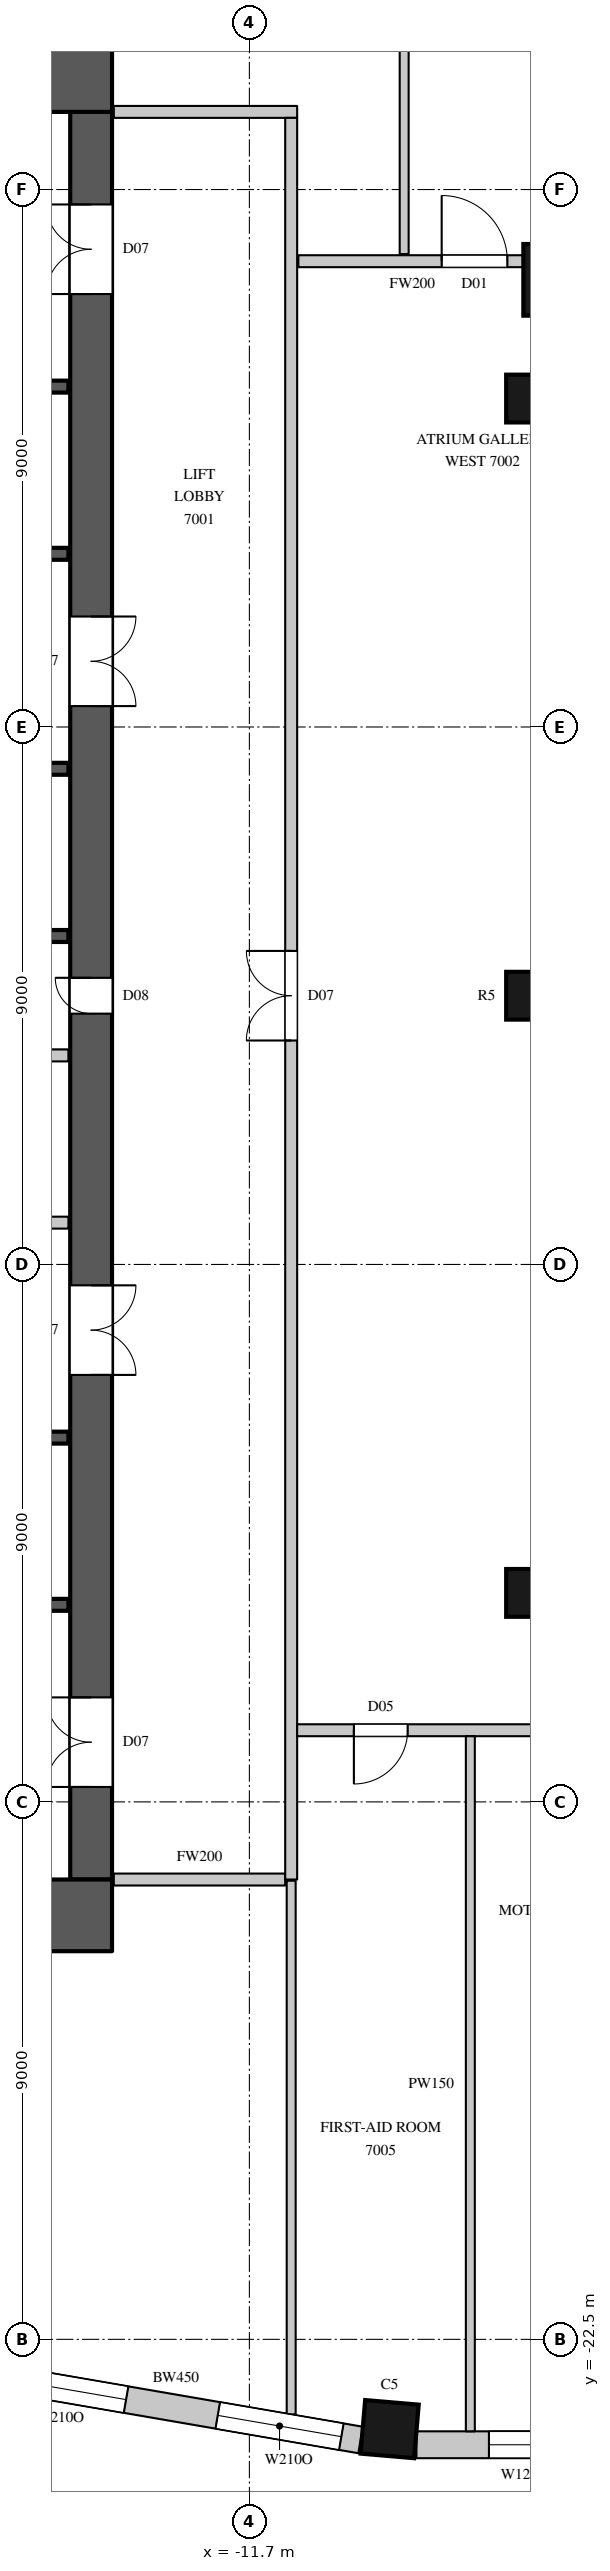
"""IFC4 building model, lengths in metres.
Left out: names, types, materials, properties, quantities, classifications, styles, units other than length and angle.
Written with IfcOpenShell. Run it as: python <this file> out.ifc"""

import sys

from ifc_helpers import new_model, si_unit, direction, frame, frame_2d, origin, origin_2d, place, context, subcontext, project, spatial, rectangle, circle, extrude, element, fill, save


model = new_model("IFC4")
c1 = context("Model", 3, precision=1e-05, world=origin(), true_north=direction((0.0, 1.0)))
c2 = subcontext(c1, "Body", "Model", "MODEL_VIEW")
j1 = project(units=[si_unit("LENGTHUNIT", "METRE"), si_unit("PLANEANGLEUNIT", "RADIAN")], contexts=[c1])
p1 = place(None, origin())
s1 = spatial("IfcSite", under=j1, at=p1, CompositionType="ELEMENT")
p2 = place(p1, origin())
s2 = spatial("IfcBuilding", under=s1, at=p2, CompositionType="ELEMENT")
p3 = place(p2, frame((0.0, 0.0, 309.0)))
s3 = spatial("IfcBuildingStorey", under=s2, at=p3, CompositionType="ELEMENT", Elevation=309.0)
p4 = place(p3, frame((-6.512, 11.988, 0.0), z_axis=(0.0, 0.0, 1.0), x_axis=(1.0, 0.0, 0.0)))
e1 = element("IfcColumn", 1, at=p4, inside=s3, PredefinedType="COLUMN", context=c2, shape_type="SweptSolid", body=[
    extrude(circle(Radius=0.6, at=origin_2d()), origin(), (0.0, 0.0, 1.0), 4.1),
])
p5 = place(p3, frame((-9.351, -24.003, 0.0), z_axis=(0.0, 0.0, 1.0), x_axis=(0.996368206733, -0.085149260784, 0.0)))
e2 = element("IfcColumn", 2, at=p5, inside=s3, PredefinedType="COLUMN", context=c2, shape_type="SweptSolid", body=[
    extrude(rectangle(XDim=0.9, YDim=0.9, at=origin_2d()), origin(), (0.0, 0.0, 1.0), 4.1),
])
for number, where, z_axis, x_axis in (
    (3, (-7.0, -10.0, 0.0), (0.0, 0.0, 1.0), (1.0, 0.0, 0.0)),
    (4, (-7.0, 0.0, 0.0), (0.0, 0.0, 1.0), (1.0, 0.0, 0.0)),
    (5, (-7.0, 10.0, 0.0), (0.0, 0.0, 1.0), (1.0, 0.0, 0.0)),
):
    element("IfcColumn", number, at=place(p3, frame(where, z_axis=z_axis, x_axis=x_axis)), inside=s3, PredefinedType="COLUMN", context=c2, shape_type="SweptSolid", body=[
        extrude(circle(Radius=0.4, at=origin_2d()), origin(), (0.0, 0.0, 1.0), 4.1),
    ])
p6 = place(p3, frame((-16.157, -23.097, 0.0), z_axis=(0.0, 0.0, 1.0), x_axis=(0.985502073964, -0.169663379113, 0.0)))
e6 = element("IfcWall", 6, at=p6, inside=s3, PredefinedType="SOLIDWALL", context=c2, shape_type="SweptSolid", body=[
    extrude(rectangle(XDim=6.412, YDim=0.45, at=frame_2d((3.206, 0.0))), origin(), (0.0, 0.0, 1.0), 3.8),
])
p7 = place(p6, frame((0.327, 0.0, 1.05)))
e7 = element("IfcOpeningElement", 7, at=p7, cuts=e6, PredefinedType="OPENING", context=c2, shape_type="SweptSolid", body=[
    extrude(rectangle(XDim=2.1, YDim=2.4, at=frame_2d((1.05, 1.2))), frame((0.0, 0.235, 0.0), z_axis=(0.0, -1.0, 0.0), x_axis=(1.0, 0.0, 0.0)), (0.0, 0.0, 1.0), 0.47),
])
p8 = place(p6, frame((3.985, 0.0, 1.05)))
e8 = element("IfcOpeningElement", 8, at=p8, cuts=e6, PredefinedType="OPENING", context=c2, shape_type="SweptSolid", body=[
    extrude(rectangle(XDim=2.1, YDim=2.4, at=frame_2d((1.05, 1.2))), frame((0.0, 0.235, 0.0), z_axis=(0.0, -1.0, 0.0), x_axis=(1.0, 0.0, 0.0)), (0.0, 0.0, 1.0), 0.47),
])
p9 = place(p3, frame((-8.903, -24.265, 0.0), z_axis=(0.0, 0.0, 1.0), x_axis=(1.0, 0.0, 0.0)))
e9 = element("IfcWall", 9, at=p9, inside=s3, PredefinedType="SOLIDWALL", context=c2, shape_type="SweptSolid", body=[
    extrude(rectangle(XDim=6.406, YDim=0.45, at=frame_2d((3.203, 0.0))), origin(), (0.0, 0.0, 1.0), 3.8),
])
p10 = place(p9, frame((3.98, 0.0, 1.05)))
e10 = element("IfcOpeningElement", 10, at=p10, cuts=e9, PredefinedType="OPENING", context=c2, shape_type="SweptSolid", body=[
    extrude(rectangle(XDim=2.1, YDim=2.4, at=frame_2d((1.05, 1.2))), frame((0.0, 0.235, 0.0), z_axis=(0.0, -1.0, 0.0), x_axis=(1.0, 0.0, 0.0)), (0.0, 0.0, 1.0), 0.47),
])
p11 = place(p9, frame((1.214, 0.0, 1.05)))
e11 = element("IfcOpeningElement", 11, at=p11, cuts=e9, PredefinedType="OPENING", context=c2, shape_type="SweptSolid", body=[
    extrude(rectangle(XDim=1.2, YDim=2.4, at=frame_2d((0.6, 1.2))), frame((0.0, 0.235, 0.0), z_axis=(0.0, -1.0, 0.0), x_axis=(1.0, 0.0, 0.0)), (0.0, 0.0, 1.0), 0.47),
])
for number, where, z_axis, x_axis in (
    (12, (-30.0, 15.4, 0.0), (0.0, 0.0, 1.0), (1.0, 0.0, 0.0)),
    (13, (-30.0, -15.4, 0.0), (0.0, 0.0, 1.0), (1.0, 0.0, 0.0)),
):
    element("IfcWall", number, at=place(p3, frame(where, z_axis=z_axis, x_axis=x_axis)), inside=s3, PredefinedType="SHEAR", context=c2, shape_type="SweptSolid", body=[
        extrude(rectangle(XDim=16.0, YDim=1.2, at=frame_2d((8.0, 0.0))), origin(), (0.0, 0.0, 1.0), 4.1),
    ])
p12 = place(p3, frame((-14.35, -14.8, 0.0), z_axis=(0.0, 0.0, 1.0), x_axis=(0.0, 1.0, 0.0)))
e14 = element("IfcWall", 14, at=p12, inside=s3, PredefinedType="SHEAR", context=c2, shape_type="SweptSolid", body=[
    extrude(rectangle(XDim=29.6, YDim=0.7, at=frame_2d((14.8, 0.0))), origin(), (0.0, 0.0, 1.0), 4.1),
])
p13 = place(p12, frame((1.55, 0.0, 0.0)))
e15 = element("IfcOpeningElement", 15, at=p13, cuts=e14, PredefinedType="OPENING", context=c2, shape_type="SweptSolid", body=[
    extrude(rectangle(XDim=1.5, YDim=2.4, at=frame_2d((0.75, 1.2))), frame((0.0, 0.36, 0.0), z_axis=(0.0, -1.0, 0.0), x_axis=(1.0, 0.0, 0.0)), (0.0, 0.0, 1.0), 0.72),
])
p14 = place(p12, frame((26.55, 0.0, 0.0)))
e16 = element("IfcOpeningElement", 16, at=p14, cuts=e14, PredefinedType="OPENING", context=c2, shape_type="SweptSolid", body=[
    extrude(rectangle(XDim=1.5, YDim=2.4, at=frame_2d((0.75, 1.2))), frame((0.0, 0.36, 0.0), z_axis=(0.0, -1.0, 0.0), x_axis=(1.0, 0.0, 0.0)), (0.0, 0.0, 1.0), 0.72),
])
p15 = place(p12, frame((8.45, 0.0, 0.0)))
e17 = element("IfcOpeningElement", 17, at=p15, cuts=e14, PredefinedType="OPENING", context=c2, shape_type="SweptSolid", body=[
    extrude(rectangle(XDim=1.5, YDim=2.4, at=frame_2d((0.75, 1.2))), frame((0.0, 0.36, 0.0), z_axis=(0.0, -1.0, 0.0), x_axis=(1.0, 0.0, 0.0)), (0.0, 0.0, 1.0), 0.72),
])
p16 = place(p12, frame((19.65, 0.0, 0.0)))
e18 = element("IfcOpeningElement", 18, at=p16, cuts=e14, PredefinedType="OPENING", context=c2, shape_type="SweptSolid", body=[
    extrude(rectangle(XDim=1.5, YDim=2.4, at=frame_2d((0.75, 1.2))), frame((0.0, 0.36, 0.0), z_axis=(0.0, -1.0, 0.0), x_axis=(1.0, 0.0, 0.0)), (0.0, 0.0, 1.0), 0.72),
])
p17 = place(p12, frame((14.5, 0.0, 0.0)))
e19 = element("IfcOpeningElement", 19, at=p17, cuts=e14, PredefinedType="OPENING", context=c2, shape_type="SweptSolid", body=[
    extrude(rectangle(XDim=0.6, YDim=2.0, at=frame_2d((0.3, 1.0))), frame((0.0, 0.36, 0.0), z_axis=(0.0, -1.0, 0.0), x_axis=(1.0, 0.0, 0.0)), (0.0, 0.0, 1.0), 0.72),
])
p18 = place(p3, frame((-29.27, -3.8, 0.0), z_axis=(0.0, 0.0, 1.0), x_axis=(1.0, 0.0, 0.0)))
e20 = element("IfcWall", 20, at=p18, inside=s3, PredefinedType="PARTITIONING", context=c2, shape_type="SweptSolid", body=[
    extrude(rectangle(XDim=14.54, YDim=0.2, at=frame_2d((7.27, 0.0))), origin(), (0.0, 0.0, 1.0), 3.8),
])
p19 = place(p18, frame((6.8, 0.0, 0.0)))
e21 = element("IfcOpeningElement", 21, at=p19, cuts=e20, PredefinedType="OPENING", context=c2, shape_type="SweptSolid", body=[
    extrude(rectangle(XDim=0.9, YDim=2.2, at=frame_2d((0.45, 1.1))), frame((0.0, 0.11, 0.0), z_axis=(0.0, -1.0, 0.0), x_axis=(1.0, 0.0, 0.0)), (0.0, 0.0, 1.0), 0.22),
])
p20 = place(p3, frame((-13.97, -14.8, 0.0), z_axis=(0.0, 0.0, 1.0), x_axis=(1.0, 0.0, 0.0)))
e22 = element("IfcWall", 22, at=p20, inside=s3, PredefinedType="PARTITIONING", context=c2, shape_type="SweptSolid", body=[
    extrude(rectangle(XDim=2.87, YDim=0.2, at=frame_2d((1.435, 0.0))), origin(), (0.0, 0.0, 1.0), 3.8),
])
p21 = place(p3, frame((-13.97, 14.8, 0.0), z_axis=(0.0, 0.0, 1.0), x_axis=(1.0, 0.0, 0.0)))
e23 = element("IfcWall", 23, at=p21, inside=s3, PredefinedType="PARTITIONING", context=c2, shape_type="SweptSolid", body=[
    extrude(rectangle(XDim=3.07, YDim=0.2, at=frame_2d((1.535, 0.0))), origin(), (0.0, 0.0, 1.0), 3.8),
])
p22 = place(p3, frame((-11.0, -14.8, 0.0), z_axis=(0.0, 0.0, 1.0), x_axis=(0.0, 1.0, 0.0)))
e24 = element("IfcWall", 24, at=p22, inside=s3, PredefinedType="PARTITIONING", context=c2, shape_type="SweptSolid", body=[
    extrude(rectangle(XDim=29.5, YDim=0.2, at=frame_2d((14.75, 0.0))), origin(), (0.0, 0.0, 1.0), 3.8),
])
p23 = place(p22, frame((14.05, 0.0, 0.0)))
e25 = element("IfcOpeningElement", 25, at=p23, cuts=e24, PredefinedType="OPENING", context=c2, shape_type="SweptSolid", body=[
    extrude(rectangle(XDim=1.5, YDim=2.4, at=frame_2d((0.75, 1.2))), frame((0.0, 0.11, 0.0), z_axis=(0.0, -1.0, 0.0), x_axis=(1.0, 0.0, 0.0)), (0.0, 0.0, 1.0), 0.22),
])
p24 = place(p3, frame((-10.9, -12.3, 0.0), z_axis=(0.0, 0.0, 1.0), x_axis=(1.0, 0.0, 0.0)))
e26 = element("IfcWall", 26, at=p24, inside=s3, PredefinedType="PARTITIONING", context=c2, shape_type="SweptSolid", body=[
    extrude(rectangle(XDim=22.1, YDim=0.2, at=frame_2d((11.05, 0.0))), origin(), (0.0, 0.0, 1.0), 3.8),
])
p25 = place(p24, frame((0.95, 0.0, 0.0)))
e27 = element("IfcOpeningElement", 27, at=p25, cuts=e26, PredefinedType="OPENING", context=c2, shape_type="SweptSolid", body=[
    extrude(rectangle(XDim=0.9, YDim=2.2, at=frame_2d((0.45, 1.1))), frame((0.0, 0.11, 0.0), z_axis=(0.0, -1.0, 0.0), x_axis=(1.0, 0.0, 0.0)), (0.0, 0.0, 1.0), 0.22),
])
p26 = place(p24, frame((3.95, 0.0, 0.0)))
e28 = element("IfcOpeningElement", 28, at=p26, cuts=e26, PredefinedType="OPENING", context=c2, shape_type="SweptSolid", body=[
    extrude(rectangle(XDim=0.9, YDim=2.2, at=frame_2d((0.45, 1.1))), frame((0.0, 0.11, 0.0), z_axis=(0.0, -1.0, 0.0), x_axis=(1.0, 0.0, 0.0)), (0.0, 0.0, 1.0), 0.22),
])
p27 = place(p24, frame((7.1, 0.0, 0.0)))
e29 = element("IfcOpeningElement", 29, at=p27, cuts=e26, PredefinedType="OPENING", context=c2, shape_type="SweptSolid", body=[
    extrude(rectangle(XDim=0.9, YDim=2.2, at=frame_2d((0.45, 1.1))), frame((0.0, 0.11, 0.0), z_axis=(0.0, -1.0, 0.0), x_axis=(1.0, 0.0, 0.0)), (0.0, 0.0, 1.0), 0.22),
])
p28 = place(p24, frame((10.0, 0.0, 0.0)))
e30 = element("IfcOpeningElement", 30, at=p28, cuts=e26, PredefinedType="OPENING", context=c2, shape_type="SweptSolid", body=[
    extrude(rectangle(XDim=0.9, YDim=2.2, at=frame_2d((0.45, 1.1))), frame((0.0, 0.11, 0.0), z_axis=(0.0, -1.0, 0.0), x_axis=(1.0, 0.0, 0.0)), (0.0, 0.0, 1.0), 0.22),
])
p29 = place(p24, frame((13.25, 0.0, 0.0)))
e31 = element("IfcOpeningElement", 31, at=p29, cuts=e26, PredefinedType="OPENING", context=c2, shape_type="SweptSolid", body=[
    extrude(rectangle(XDim=0.9, YDim=2.2, at=frame_2d((0.45, 1.1))), frame((0.0, 0.11, 0.0), z_axis=(0.0, -1.0, 0.0), x_axis=(1.0, 0.0, 0.0)), (0.0, 0.0, 1.0), 0.22),
])
p30 = place(p24, frame((16.85, 0.0, 0.0)))
e32 = element("IfcOpeningElement", 32, at=p30, cuts=e26, PredefinedType="OPENING", context=c2, shape_type="SweptSolid", body=[
    extrude(rectangle(XDim=1.1, YDim=2.4, at=frame_2d((0.55, 1.2))), frame((0.0, 0.11, 0.0), z_axis=(0.0, -1.0, 0.0), x_axis=(1.0, 0.0, 0.0)), (0.0, 0.0, 1.0), 0.22),
])
p31 = place(p3, frame((-10.88, 12.3, 0.0), z_axis=(0.0, 0.0, 1.0), x_axis=(1.0, 0.0, 0.0)))
e33 = element("IfcWall", 33, at=p31, inside=s3, PredefinedType="PARTITIONING", context=c2, shape_type="SweptSolid", body=[
    extrude(rectangle(XDim=3.818, YDim=0.2, at=frame_2d((1.909, 0.0))), origin(), (0.0, 0.0, 1.0), 3.8),
])
p32 = place(p31, frame((2.4, 0.0, 0.0)))
e34 = element("IfcOpeningElement", 34, at=p32, cuts=e33, PredefinedType="OPENING", context=c2, shape_type="SweptSolid", body=[
    extrude(rectangle(XDim=1.1, YDim=2.4, at=frame_2d((0.55, 1.2))), frame((0.0, 0.11, 0.0), z_axis=(0.0, -1.0, 0.0), x_axis=(1.0, 0.0, 0.0)), (0.0, 0.0, 1.0), 0.22),
])
p33 = place(p3, frame((-11.0, -23.757, 0.0), z_axis=(0.0, 0.0, 1.0), x_axis=(0.0, 1.0, 0.0)))
e35 = element("IfcWall", 35, at=p33, inside=s3, PredefinedType="PARTITIONING", context=c2, shape_type="SweptSolid", body=[
    extrude(rectangle(XDim=8.937, YDim=0.15, at=frame_2d((4.468, 0.0))), origin(), (0.0, 0.0, 1.0), 3.8),
])
p34 = place(p3, frame((-9.108, 12.42, 0.0), z_axis=(0.0, 0.0, 1.0), x_axis=(0.0, 1.0, 0.0)))
e36 = element("IfcWall", 36, at=p34, inside=s3, PredefinedType="PARTITIONING", context=c2, shape_type="SweptSolid", body=[
    extrude(rectangle(XDim=12.617, YDim=0.15, at=frame_2d((6.309, 0.0))), origin(), (0.0, 0.0, 1.0), 3.8),
])
p35 = place(p3, frame((-8.0, -24.04, 0.0), z_axis=(0.0, 0.0, 1.0), x_axis=(0.0, 1.0, 0.0)))
e37 = element("IfcWall", 37, at=p35, inside=s3, PredefinedType="PARTITIONING", context=c2, shape_type="SweptSolid", body=[
    extrude(rectangle(XDim=11.64, YDim=0.15, at=frame_2d((5.82, 0.0))), origin(), (0.0, 0.0, 1.0), 3.8),
])
p36 = place(p3, frame((-29.27, -1.0, 0.0), z_axis=(0.0, 0.0, 1.0), x_axis=(1.0, 0.0, 0.0)))
e38 = element("IfcWall", 38, at=p36, inside=s3, PredefinedType="PARTITIONING", context=c2, shape_type="SweptSolid", body=[
    extrude(rectangle(XDim=14.54, YDim=0.2, at=frame_2d((7.27, 0.0))), origin(), (0.0, 0.0, 1.0), 3.8),
])
p37 = place(p3, frame((-17.92, -10.2, 0.0), z_axis=(0.0, 0.0, 1.0), x_axis=(1.0, 0.0, 0.0)))
e39 = element("IfcWall", 39, at=p37, inside=s3, PredefinedType="SHEAR", context=c2, shape_type="SweptSolid", body=[
    extrude(rectangle(XDim=3.19, YDim=0.2, at=frame_2d((1.595, 0.0))), origin(), (0.0, 0.0, 1.0), 3.8),
])
p38 = place(p37, frame((1.05, 0.0, 0.0)))
e40 = element("IfcOpeningElement", 40, at=p38, cuts=e39, PredefinedType="OPENING", context=c2, shape_type="SweptSolid", body=[
    extrude(rectangle(XDim=1.1, YDim=2.2, at=frame_2d((0.55, 1.1))), frame((0.0, 0.11, 0.0), z_axis=(0.0, -1.0, 0.0), x_axis=(1.0, 0.0, 0.0)), (0.0, 0.0, 1.0), 0.22),
])
for number, where, z_axis, x_axis in (
    (41, (-17.9, -7.4, 0.0), (0.0, 0.0, 1.0), (1.0, 0.0, 0.0)),
    (42, (-17.9, 1.0, 0.0), (0.0, 0.0, 1.0), (1.0, 0.0, 0.0)),
):
    element("IfcWall", number, at=place(p3, frame(where, z_axis=z_axis, x_axis=x_axis)), inside=s3, PredefinedType="SHEAR", context=c2, shape_type="SweptSolid", body=[
        extrude(rectangle(XDim=3.17, YDim=0.2, at=frame_2d((1.585, 0.0))), origin(), (0.0, 0.0, 1.0), 3.8),
    ])
p39 = place(p3, frame((-17.9, 3.8, 0.0), z_axis=(0.0, 0.0, 1.0), x_axis=(1.0, 0.0, 0.0)))
e43 = element("IfcWall", 43, at=p39, inside=s3, PredefinedType="SHEAR", context=c2, shape_type="SweptSolid", body=[
    extrude(rectangle(XDim=3.17, YDim=0.2, at=frame_2d((1.585, 0.0))), origin(), (0.0, 0.0, 1.0), 3.8),
])
p40 = place(p39, frame((1.05, 0.0, 0.0)))
e44 = element("IfcOpeningElement", 44, at=p40, cuts=e43, PredefinedType="OPENING", context=c2, shape_type="SweptSolid", body=[
    extrude(rectangle(XDim=1.1, YDim=2.2, at=frame_2d((0.55, 1.1))), frame((0.0, 0.11, 0.0), z_axis=(0.0, -1.0, 0.0), x_axis=(1.0, 0.0, 0.0)), (0.0, 0.0, 1.0), 0.22),
])
p41 = place(p3, frame((-17.92, 7.4, 0.0), z_axis=(0.0, 0.0, 1.0), x_axis=(1.0, 0.0, 0.0)))
e45 = element("IfcWall", 45, at=p41, inside=s3, PredefinedType="SHEAR", context=c2, shape_type="SweptSolid", body=[
    extrude(rectangle(XDim=3.19, YDim=0.2, at=frame_2d((1.595, 0.0))), origin(), (0.0, 0.0, 1.0), 3.8),
])
p42 = place(p3, frame((-17.92, 10.2, 0.0), z_axis=(0.0, 0.0, 1.0), x_axis=(1.0, 0.0, 0.0)))
e46 = element("IfcWall", 46, at=p42, inside=s3, PredefinedType="SHEAR", context=c2, shape_type="SweptSolid", body=[
    extrude(rectangle(XDim=3.19, YDim=0.2, at=frame_2d((1.595, 0.0))), origin(), (0.0, 0.0, 1.0), 3.8),
])
p43 = place(p42, frame((1.05, 0.0, 0.0)))
e47 = element("IfcOpeningElement", 47, at=p43, cuts=e46, PredefinedType="OPENING", context=c2, shape_type="SweptSolid", body=[
    extrude(rectangle(XDim=1.1, YDim=2.2, at=frame_2d((0.55, 1.1))), frame((0.0, 0.11, 0.0), z_axis=(0.0, -1.0, 0.0), x_axis=(1.0, 0.0, 0.0)), (0.0, 0.0, 1.0), 0.22),
])
p44 = place(p7, origin())
e48 = element("IfcWindow", 48, at=p44, inside=s3, PartitioningType="SINGLE_PANEL", PredefinedType="WINDOW", context=c2, shape_type="SweptSolid", body=[
    extrude(rectangle(XDim=2.1, YDim=2.4, at=frame_2d((1.05, 1.2))), frame((0.0, 0.135, 0.0), z_axis=(0.0, -1.0, 0.0), x_axis=(1.0, 0.0, 0.0)), (0.0, 0.0, 1.0), 0.06),
])
fill(e7, e48)
p45 = place(p8, origin())
e49 = element("IfcWindow", 49, at=p45, inside=s3, PartitioningType="SINGLE_PANEL", PredefinedType="WINDOW", context=c2, shape_type="SweptSolid", body=[
    extrude(rectangle(XDim=2.1, YDim=2.4, at=frame_2d((1.05, 1.2))), frame((0.0, 0.135, 0.0), z_axis=(0.0, -1.0, 0.0), x_axis=(1.0, 0.0, 0.0)), (0.0, 0.0, 1.0), 0.06),
])
fill(e8, e49)
p46 = place(p23, origin())
e50 = element("IfcDoor", 50, at=p46, inside=s3, OperationType="DOUBLE_DOOR_SINGLE_SWING", PredefinedType="DOOR", context=c2, shape_type="SweptSolid", body=[
    extrude(rectangle(XDim=1.5, YDim=2.4, at=frame_2d((0.75, 1.2))), frame((0.0, 0.025, 0.0), z_axis=(0.0, -1.0, 0.0), x_axis=(1.0, 0.0, 0.0)), (0.0, 0.0, 1.0), 0.05),
])
fill(e25, e50)
p47 = place(p25, origin())
e51 = element("IfcDoor", 51, at=p47, inside=s3, OperationType="SINGLE_SWING_RIGHT", PredefinedType="DOOR", context=c2, shape_type="SweptSolid", body=[
    extrude(rectangle(XDim=0.9, YDim=2.2, at=frame_2d((0.45, 1.1))), frame((0.0, 0.025, 0.0), z_axis=(0.0, -1.0, 0.0), x_axis=(1.0, 0.0, 0.0)), (0.0, 0.0, 1.0), 0.05),
])
fill(e27, e51)
p48 = place(p32, origin())
e52 = element("IfcDoor", 52, at=p48, inside=s3, OperationType="SINGLE_SWING_LEFT", PredefinedType="DOOR", context=c2, shape_type="SweptSolid", body=[
    extrude(rectangle(XDim=1.1, YDim=2.4, at=frame_2d((0.55, 1.2))), frame((0.0, 0.025, 0.0), z_axis=(0.0, -1.0, 0.0), x_axis=(1.0, 0.0, 0.0)), (0.0, 0.0, 1.0), 0.05),
])
fill(e34, e52)
p49 = place(p13, origin())
e53 = element("IfcDoor", 53, at=p49, inside=s3, OperationType="DOUBLE_DOOR_SINGLE_SWING", PredefinedType="DOOR", context=c2, shape_type="SweptSolid", body=[
    extrude(rectangle(XDim=1.5, YDim=2.4, at=frame_2d((0.75, 1.2))), frame((0.0, 0.345, 0.0), z_axis=(0.0, -1.0, 0.0), x_axis=(1.0, 0.0, 0.0)), (0.0, 0.0, 1.0), 0.05),
])
fill(e15, e53)
p50 = place(p14, origin())
e54 = element("IfcDoor", 54, at=p50, inside=s3, OperationType="DOUBLE_DOOR_SINGLE_SWING", PredefinedType="DOOR", context=c2, shape_type="SweptSolid", body=[
    extrude(rectangle(XDim=1.5, YDim=2.4, at=frame_2d((0.75, 1.2))), frame((0.0, 0.345, 0.0), z_axis=(0.0, -1.0, 0.0), x_axis=(1.0, 0.0, 0.0)), (0.0, 0.0, 1.0), 0.05),
])
fill(e16, e54)
p51 = place(p15, origin())
e55 = element("IfcDoor", 55, at=p51, inside=s3, OperationType="DOUBLE_DOOR_SINGLE_SWING", PredefinedType="DOOR", context=c2, shape_type="SweptSolid", body=[
    extrude(rectangle(XDim=1.5, YDim=2.4, at=frame_2d((0.75, 1.2))), frame((0.0, -0.295, 0.0), z_axis=(0.0, -1.0, 0.0), x_axis=(1.0, 0.0, 0.0)), (0.0, 0.0, 1.0), 0.05),
])
fill(e17, e55)
p52 = place(p16, origin())
e56 = element("IfcDoor", 56, at=p52, inside=s3, OperationType="DOUBLE_DOOR_SINGLE_SWING", PredefinedType="DOOR", context=c2, shape_type="SweptSolid", body=[
    extrude(rectangle(XDim=1.5, YDim=2.4, at=frame_2d((0.75, 1.2))), frame((0.0, -0.295, 0.0), z_axis=(0.0, -1.0, 0.0), x_axis=(1.0, 0.0, 0.0)), (0.0, 0.0, 1.0), 0.05),
])
fill(e18, e56)
p53 = place(p17, origin())
e57 = element("IfcDoor", 57, at=p53, inside=s3, OperationType="SINGLE_SWING_RIGHT", PredefinedType="DOOR", context=c2, shape_type="SweptSolid", body=[
    extrude(rectangle(XDim=0.6, YDim=2.0, at=frame_2d((0.3, 1.0))), frame((0.0, 0.345, 0.0), z_axis=(0.0, -1.0, 0.0), x_axis=(1.0, 0.0, 0.0)), (0.0, 0.0, 1.0), 0.05),
])
fill(e19, e57)
p54 = place(p11, origin())
e58 = element("IfcWindow", 58, at=p54, inside=s3, PartitioningType="SINGLE_PANEL", PredefinedType="WINDOW", context=c2, shape_type="SweptSolid", body=[
    extrude(rectangle(XDim=1.2, YDim=2.4, at=frame_2d((0.6, 1.2))), frame((0.0, 0.135, 0.0), z_axis=(0.0, -1.0, 0.0), x_axis=(1.0, 0.0, 0.0)), (0.0, 0.0, 1.0), 0.06),
])
fill(e11, e58)
save(model, sys.argv[1])
